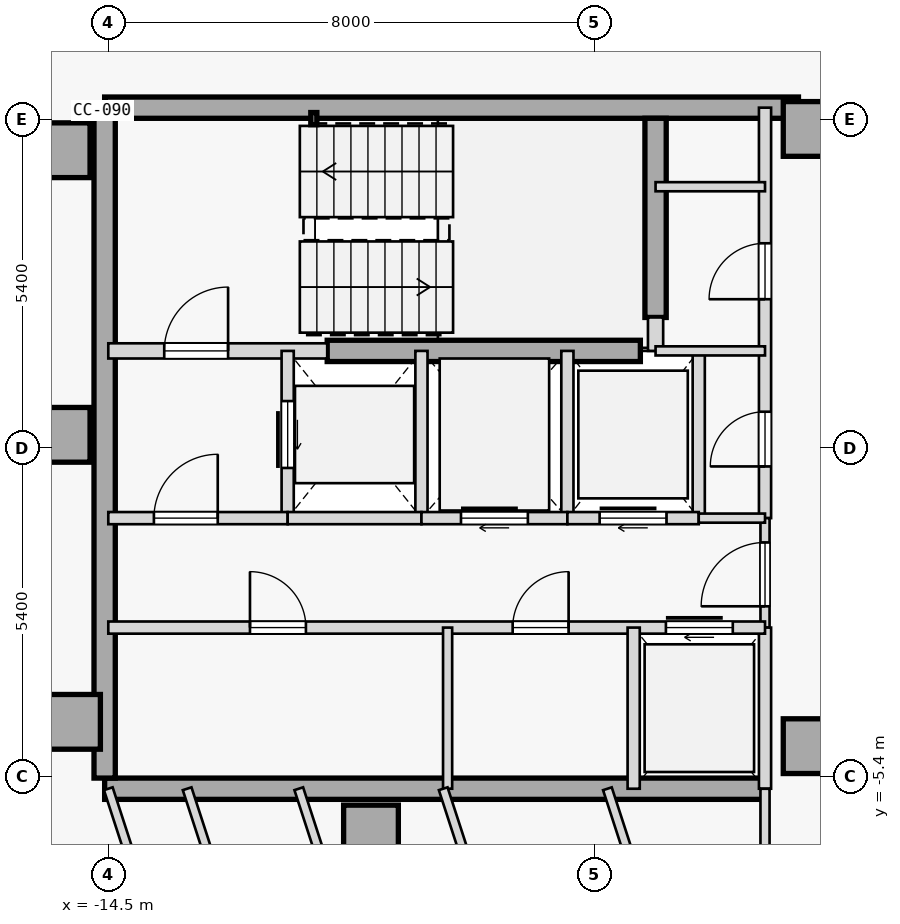
"""IFC4 building model, lengths in metres.
Left out: names, types, materials, properties, quantities, classifications, styles, units other than length and angle.
Written with IfcOpenShell. Run it as: python <this file> out.ifc"""

import sys

from ifc_helpers import new_model, si_unit, direction, frame, frame_2d, origin, origin_2d, place, context, subcontext, project, spatial, rectangle, hollow_rectangle, extrude, element, fill, save


model = new_model("IFC4")
c1 = context("Model", 3, precision=1e-05, world=origin(), true_north=direction((0.0, 1.0)))
c2 = subcontext(c1, "Body", "Model", "MODEL_VIEW")
j1 = project(units=[si_unit("LENGTHUNIT", "METRE"), si_unit("PLANEANGLEUNIT", "RADIAN")], contexts=[c1])
p1 = place(None, origin())
s1 = spatial("IfcSite", under=j1, at=p1, CompositionType="ELEMENT")
p2 = place(p1, origin())
s2 = spatial("IfcBuilding", under=s1, at=p2, CompositionType="ELEMENT")
p3 = place(p2, frame((0.0, 0.0, 244.4)))
s3 = spatial("IfcBuildingStorey", under=s2, at=p3, CompositionType="ELEMENT", Elevation=244.4)
for number, where, z_axis, x_axis in (
    (1, (-15.25, 4.9, 0.0), (0.0, 0.0, 1.0), (1.0, 0.0, 0.0)),
    (2, (-15.25, 0.22, 0.0), (0.0, 0.0, 1.0), (1.0, 0.0, 0.0)),
    (3, (-15.08, -4.5, 0.0), (0.0, 0.0, 1.0), (1.0, 0.0, 0.0)),
    (4, (-10.18, -6.32, 0.0), (0.0, 0.0, 1.0), (1.0, 0.0, 0.0)),
    (5, (-2.95, -4.9, 0.0), (0.0, 0.0, 1.0), (1.0, 0.0, 0.0)),
    (6, (-2.95, 5.25, 0.0), (0.0, 0.0, 1.0), (1.0, 0.0, 0.0)),
):
    element("IfcColumn", number, at=place(p3, frame(where, z_axis=z_axis, x_axis=x_axis)), inside=s3, PredefinedType="COLUMN", context=c2, shape_type="SweptSolid", body=[
        extrude(rectangle(XDim=0.9, YDim=0.9, at=origin_2d()), origin(), (0.0, 0.0, 1.0), 3.35),
    ])
p4 = place(p3, frame((-14.56, 5.6, 0.0), z_axis=(0.0, 0.0, 1.0), x_axis=(1.0, 0.0, 0.0)))
e7 = element("IfcWall", 7, at=p4, inside=s3, PredefinedType="SHEAR", context=c2, shape_type="SweptSolid", body=[
    extrude(rectangle(XDim=11.41, YDim=0.35, at=frame_2d((5.705, 0.0))), origin(), (0.0, 0.0, 1.0), 3.125),
])
p5 = place(p3, frame((-14.56, -5.6, 0.0), z_axis=(0.0, 0.0, 1.0), x_axis=(1.0, 0.0, 0.0)))
e8 = element("IfcWall", 8, at=p5, inside=s3, PredefinedType="SHEAR", context=c2, shape_type="SweptSolid", body=[
    extrude(rectangle(XDim=10.86, YDim=0.35, at=frame_2d((5.43, 0.0))), origin(), (0.0, 0.0, 1.0), 3.125),
])
p6 = place(p3, frame((-14.56, -5.425, 0.0), z_axis=(0.0, 0.0, 1.0), x_axis=(0.0, 1.0, 0.0)))
e9 = element("IfcWall", 9, at=p6, inside=s3, PredefinedType="SHEAR", context=c2, shape_type="SweptSolid", body=[
    extrude(rectangle(XDim=10.85, YDim=0.35, at=frame_2d((5.425, 0.0))), origin(), (0.0, 0.0, 1.0), 3.125),
])
p7 = place(p3, frame((-5.5, 2.15, 0.0), z_axis=(0.0, 0.0, 1.0), x_axis=(0.0, 1.0, 0.0)))
e10 = element("IfcWall", 10, at=p7, inside=s3, PredefinedType="SHEAR", context=c2, shape_type="SweptSolid", body=[
    extrude(rectangle(XDim=3.275, YDim=0.35, at=frame_2d((1.638, 0.0))), origin(), (0.0, 0.0, 1.0), 3.125),
])
p8 = place(p3, frame((-10.9, 1.6, 0.0), z_axis=(0.0, 0.0, 1.0), x_axis=(1.0, 0.0, 0.0)))
e11 = element("IfcWall", 11, at=p8, inside=s3, PredefinedType="SHEAR", context=c2, shape_type="SweptSolid", body=[
    extrude(rectangle(XDim=5.15, YDim=0.35, at=frame_2d((2.575, 0.0))), origin(), (0.0, 0.0, 1.0), 3.125),
])
p9 = place(p3, frame((-11.12, 5.42, 0.0), z_axis=(0.0, 0.0, 1.0), x_axis=(1.0, 0.0, 0.0)))
e12 = element("IfcColumn", 12, at=p9, inside=s3, PredefinedType="COLUMN", context=c2, shape_type="SweptSolid", body=[
    extrude(hollow_rectangle(XDim=0.1, YDim=0.2, WallThickness=0.008, at=origin_2d()), origin(), (0.0, 0.0, 1.0), 3.35),
])
p10 = place(p3, frame((-14.5, 1.6, 0.0), z_axis=(0.0, 0.0, 1.0), x_axis=(1.0, 0.0, 0.0)))
e13 = element("IfcWall", 13, at=p10, inside=s3, PredefinedType="STANDARD", context=c2, shape_type="SweptSolid", body=[
    extrude(rectangle(XDim=3.6, YDim=0.25, at=frame_2d((1.8, 0.0))), origin(), (0.0, 0.0, 1.0), 3.125),
])
p11 = place(p10, frame((0.92, 0.0, 0.0)))
e14 = element("IfcOpeningElement", 14, at=p11, cuts=e13, PredefinedType="OPENING", context=c2, shape_type="SweptSolid", body=[
    extrude(rectangle(XDim=1.05, YDim=2.15, at=frame_2d((0.525, 1.075))), frame((0.0, 0.135, 0.0), z_axis=(0.0, -1.0, 0.0), x_axis=(1.0, 0.0, 0.0)), (0.0, 0.0, 1.0), 0.27),
])
p12 = place(p3, frame((-5.5, 1.6, 0.0), z_axis=(0.0, 0.0, 1.0), x_axis=(0.0, 1.0, 0.0)))
e15 = element("IfcWall", 15, at=p12, inside=s3, PredefinedType="STANDARD", context=c2, shape_type="SweptSolid", body=[
    extrude(rectangle(XDim=0.55, YDim=0.25, at=frame_2d((0.275, 0.0))), origin(), (0.0, 0.0, 1.0), 3.125),
])
p13 = place(p3, frame((-3.7, -1.15, 0.0), z_axis=(0.0, 0.0, 1.0), x_axis=(0.0, 1.0, 0.0)))
e16 = element("IfcWall", 16, at=p13, inside=s3, PredefinedType="STANDARD", context=c2, shape_type="SweptSolid", body=[
    extrude(rectangle(XDim=6.75, YDim=0.2, at=frame_2d((3.375, 0.0))), origin(), (0.0, 0.0, 1.0), 3.125),
])
p14 = place(p13, frame((3.6, 0.0, 0.0)))
e17 = element("IfcOpeningElement", 17, at=p14, cuts=e16, PredefinedType="OPENING", context=c2, shape_type="SweptSolid", body=[
    extrude(rectangle(XDim=0.92, YDim=2.15, at=frame_2d((0.46, 1.075))), frame((0.0, 0.11, 0.0), z_axis=(0.0, -1.0, 0.0), x_axis=(1.0, 0.0, 0.0)), (0.0, 0.0, 1.0), 0.22),
])
p15 = place(p13, frame((0.85, 0.0, 0.0)))
e18 = element("IfcOpeningElement", 18, at=p15, cuts=e16, PredefinedType="OPENING", context=c2, shape_type="SweptSolid", body=[
    extrude(rectangle(XDim=0.9, YDim=2.15, at=frame_2d((0.45, 1.075))), frame((0.0, 0.11, 0.0), z_axis=(0.0, -1.0, 0.0), x_axis=(1.0, 0.0, 0.0)), (0.0, 0.0, 1.0), 0.22),
])
p16 = place(p3, frame((-3.7, -2.95, 0.0), z_axis=(0.0, 0.0, 1.0), x_axis=(0.0, 1.0, 0.0)))
e19 = element("IfcWall", 19, at=p16, inside=s3, PredefinedType="PARTITIONING", context=c2, shape_type="SweptSolid", body=[
    extrude(rectangle(XDim=1.8, YDim=0.15, at=frame_2d((0.9, 0.0))), origin(), (0.0, 0.0, 1.0), 3.125),
])
p17 = place(p16, frame((0.35, 0.0, 0.0)))
e20 = element("IfcOpeningElement", 20, at=p17, cuts=e19, PredefinedType="OPENING", context=c2, shape_type="SweptSolid", body=[
    extrude(rectangle(XDim=1.05, YDim=2.18, at=frame_2d((0.525, 1.09))), frame((0.0, 0.085, 0.0), z_axis=(0.0, -1.0, 0.0), x_axis=(1.0, 0.0, 0.0)), (0.0, 0.0, 1.0), 0.17),
])
p18 = place(p3, frame((-3.7, -5.6, 0.0), z_axis=(0.0, 0.0, 1.0), x_axis=(0.0, 1.0, 0.0)))
e21 = element("IfcWall", 21, at=p18, inside=s3, PredefinedType="STANDARD", context=c2, shape_type="SweptSolid", body=[
    extrude(rectangle(XDim=2.65, YDim=0.2, at=frame_2d((1.325, 0.0))), origin(), (0.0, 0.0, 1.0), 3.125),
])
p19 = place(p3, frame((-11.55, -1.15, 0.0), z_axis=(0.0, 0.0, 1.0), x_axis=(0.0, 1.0, 0.0)))
e22 = element("IfcWall", 22, at=p19, inside=s3, PredefinedType="STANDARD", context=c2, shape_type="SweptSolid", body=[
    extrude(rectangle(XDim=2.75, YDim=0.2, at=frame_2d((1.375, 0.0))), origin(), (0.0, 0.0, 1.0), 3.125),
])
p20 = place(p19, frame((0.825, 0.0, 0.0)))
e23 = element("IfcOpeningElement", 23, at=p20, cuts=e22, PredefinedType="OPENING", context=c2, shape_type="SweptSolid", body=[
    extrude(rectangle(XDim=1.1, YDim=2.15, at=frame_2d((0.55, 1.075))), frame((0.0, 0.11, 0.0), z_axis=(0.0, -1.0, 0.0), x_axis=(1.0, 0.0, 0.0)), (0.0, 0.0, 1.0), 0.22),
])
p21 = place(p3, frame((-9.35, -1.15, 0.0), z_axis=(0.0, 0.0, 1.0), x_axis=(0.0, 1.0, 0.0)))
e24 = element("IfcWall", 24, at=p21, inside=s3, PredefinedType="STANDARD", context=c2, shape_type="SweptSolid", body=[
    extrude(rectangle(XDim=2.75, YDim=0.2, at=frame_2d((1.375, 0.0))), origin(), (0.0, 0.0, 1.0), 3.125),
])
p22 = place(p3, frame((-14.5, -1.15, 0.0), z_axis=(0.0, 0.0, 1.0), x_axis=(1.0, 0.0, 0.0)))
e25 = element("IfcWall", 25, at=p22, inside=s3, PredefinedType="STANDARD", context=c2, shape_type="SweptSolid", body=[
    extrude(rectangle(XDim=2.95, YDim=0.2, at=frame_2d((1.475, 0.0))), origin(), (0.0, 0.0, 1.0), 3.125),
])
p23 = place(p22, frame((0.75, 0.0, 0.0)))
e26 = element("IfcOpeningElement", 26, at=p23, cuts=e25, PredefinedType="OPENING", context=c2, shape_type="SweptSolid", body=[
    extrude(rectangle(XDim=1.05, YDim=2.18, at=frame_2d((0.525, 1.09))), frame((0.0, 0.11, 0.0), z_axis=(0.0, -1.0, 0.0), x_axis=(1.0, 0.0, 0.0)), (0.0, 0.0, 1.0), 0.22),
])
p24 = place(p3, frame((-11.55, -1.15, 0.0), z_axis=(0.0, 0.0, 1.0), x_axis=(1.0, 0.0, 0.0)))
e27 = element("IfcWall", 27, at=p24, inside=s3, PredefinedType="STANDARD", context=c2, shape_type="SweptSolid", body=[
    extrude(rectangle(XDim=2.2, YDim=0.2, at=frame_2d((1.1, 0.0))), origin(), (0.0, 0.0, 1.0), 3.125),
])
p25 = place(p3, frame((-6.95, -1.15, 0.0), z_axis=(0.0, 0.0, 1.0), x_axis=(0.0, 1.0, 0.0)))
e28 = element("IfcWall", 28, at=p25, inside=s3, PredefinedType="STANDARD", context=c2, shape_type="SweptSolid", body=[
    extrude(rectangle(XDim=2.75, YDim=0.2, at=frame_2d((1.375, 0.0))), origin(), (0.0, 0.0, 1.0), 3.125),
])
p26 = place(p3, frame((-9.35, -1.15, 0.0), z_axis=(0.0, 0.0, 1.0), x_axis=(1.0, 0.0, 0.0)))
e29 = element("IfcWall", 29, at=p26, inside=s3, PredefinedType="STANDARD", context=c2, shape_type="SweptSolid", body=[
    extrude(rectangle(XDim=2.4, YDim=0.2, at=frame_2d((1.2, 0.0))), origin(), (0.0, 0.0, 1.0), 3.125),
])
p27 = place(p26, frame((0.65, 0.0, 0.0)))
e30 = element("IfcOpeningElement", 30, at=p27, cuts=e29, PredefinedType="OPENING", context=c2, shape_type="SweptSolid", body=[
    extrude(rectangle(XDim=1.1, YDim=2.15, at=frame_2d((0.55, 1.075))), frame((0.0, 0.11, 0.0), z_axis=(0.0, -1.0, 0.0), x_axis=(1.0, 0.0, 0.0)), (0.0, 0.0, 1.0), 0.22),
])
p28 = place(p3, frame((-4.79, -1.15, 0.0), z_axis=(0.0, 0.0, 1.0), x_axis=(0.0, 1.0, 0.0)))
e31 = element("IfcWall", 31, at=p28, inside=s3, PredefinedType="STANDARD", context=c2, shape_type="SweptSolid", body=[
    extrude(rectangle(XDim=2.75, YDim=0.2, at=frame_2d((1.375, 0.0))), origin(), (0.0, 0.0, 1.0), 3.125),
])
p29 = place(p3, frame((-6.95, -1.15, 0.0), z_axis=(0.0, 0.0, 1.0), x_axis=(1.0, 0.0, 0.0)))
e32 = element("IfcWall", 32, at=p29, inside=s3, PredefinedType="STANDARD", context=c2, shape_type="SweptSolid", body=[
    extrude(rectangle(XDim=2.16, YDim=0.2, at=frame_2d((1.08, 0.0))), origin(), (0.0, 0.0, 1.0), 3.125),
])
p30 = place(p29, frame((0.53, 0.0, 0.0)))
e33 = element("IfcOpeningElement", 33, at=p30, cuts=e32, PredefinedType="OPENING", context=c2, shape_type="SweptSolid", body=[
    extrude(rectangle(XDim=1.1, YDim=2.15, at=frame_2d((0.55, 1.075))), frame((0.0, 0.11, 0.0), z_axis=(0.0, -1.0, 0.0), x_axis=(1.0, 0.0, 0.0)), (0.0, 0.0, 1.0), 0.22),
])
p31 = place(p3, frame((-4.79, -1.15, 0.0), z_axis=(0.0, 0.0, 1.0), x_axis=(1.0, 0.0, 0.0)))
e34 = element("IfcWall", 34, at=p31, inside=s3, PredefinedType="PARTITIONING", context=c2, shape_type="SweptSolid", body=[
    extrude(rectangle(XDim=1.09, YDim=0.15, at=frame_2d((0.545, 0.0))), origin(), (0.0, 0.0, 1.0), 3.125),
])
p32 = place(p3, frame((-14.5, -2.95, 0.0), z_axis=(0.0, 0.0, 1.0), x_axis=(1.0, 0.0, 0.0)))
e35 = element("IfcWall", 35, at=p32, inside=s3, PredefinedType="STANDARD", context=c2, shape_type="SweptSolid", body=[
    extrude(rectangle(XDim=10.8, YDim=0.2, at=frame_2d((5.4, 0.0))), origin(), (0.0, 0.0, 1.0), 3.125),
])
p33 = place(p32, frame((9.17, 0.0, 0.0)))
e36 = element("IfcOpeningElement", 36, at=p33, cuts=e35, PredefinedType="OPENING", context=c2, shape_type="SweptSolid", body=[
    extrude(rectangle(XDim=1.1, YDim=2.15, at=frame_2d((0.55, 1.075))), frame((0.0, 0.11, 0.0), z_axis=(0.0, -1.0, 0.0), x_axis=(1.0, 0.0, 0.0)), (0.0, 0.0, 1.0), 0.22),
])
p34 = place(p32, frame((2.33, 0.0, 0.0)))
e37 = element("IfcOpeningElement", 37, at=p34, cuts=e35, PredefinedType="OPENING", context=c2, shape_type="SweptSolid", body=[
    extrude(rectangle(XDim=0.92, YDim=2.15, at=frame_2d((0.46, 1.075))), frame((0.0, 0.11, 0.0), z_axis=(0.0, -1.0, 0.0), x_axis=(1.0, 0.0, 0.0)), (0.0, 0.0, 1.0), 0.22),
])
p35 = place(p32, frame((6.65, 0.0, 0.0)))
e38 = element("IfcOpeningElement", 38, at=p35, cuts=e35, PredefinedType="OPENING", context=c2, shape_type="SweptSolid", body=[
    extrude(rectangle(XDim=0.92, YDim=2.15, at=frame_2d((0.46, 1.075))), frame((0.0, 0.11, 0.0), z_axis=(0.0, -1.0, 0.0), x_axis=(1.0, 0.0, 0.0)), (0.0, 0.0, 1.0), 0.22),
])
p36 = place(p3, frame((-5.86, -5.6, 0.0), z_axis=(0.0, 0.0, 1.0), x_axis=(0.0, 1.0, 0.0)))
e39 = element("IfcWall", 39, at=p36, inside=s3, PredefinedType="STANDARD", context=c2, shape_type="SweptSolid", body=[
    extrude(rectangle(XDim=2.65, YDim=0.2, at=frame_2d((1.325, 0.0))), origin(), (0.0, 0.0, 1.0), 3.125),
])
p37 = place(p3, frame((-8.92, -5.6, 0.0), z_axis=(0.0, 0.0, 1.0), x_axis=(0.0, 1.0, 0.0)))
e40 = element("IfcWall", 40, at=p37, inside=s3, PredefinedType="PARTITIONING", context=c2, shape_type="SweptSolid", body=[
    extrude(rectangle(XDim=2.65, YDim=0.15, at=frame_2d((1.325, 0.0))), origin(), (0.0, 0.0, 1.0), 3.125),
])
for number, where, z_axis, x_axis in (
    (41, (-5.5, 4.3, 0.0), (0.0, 0.0, 1.0), (1.0, 0.0, 0.0)),
    (42, (-5.5, 1.6, 0.0), (0.0, 0.0, 1.0), (1.0, 0.0, 0.0)),
):
    element("IfcWall", number, at=place(p3, frame(where, z_axis=z_axis, x_axis=x_axis)), inside=s3, PredefinedType="PARTITIONING", context=c2, shape_type="SweptSolid", body=[
        extrude(rectangle(XDim=1.8, YDim=0.15, at=frame_2d((0.9, 0.0))), origin(), (0.0, 0.0, 1.0), 3.125),
    ])
p38 = place(p3, frame((-17.202, 6.426, 0.0), z_axis=(0.0, 0.0, 1.0), x_axis=(0.951035595692, 0.309081373955, 0.0)))
e43 = element("IfcWall", 43, at=p38, inside=s3, PredefinedType="PARTITIONING", context=c2, shape_type="SweptSolid", body=[
    extrude(rectangle(XDim=2.35, YDim=0.15, at=frame_2d((1.175, 0.0))), origin(), (0.0, 0.0, 1.0), 3.125),
])
p39 = place(p3, frame((-3.7, -11.514, 0.0), z_axis=(0.0, 0.0, 1.0), x_axis=(-8.2572974e-05, 0.999999996591, 0.0)))
e44 = element("IfcWall", 44, at=p39, inside=s3, PredefinedType="PARTITIONING", context=c2, shape_type="SweptSolid", body=[
    extrude(rectangle(XDim=5.913, YDim=0.15, at=frame_2d((2.957, 0.0))), origin(), (0.0, 0.0, 1.0), 3.125),
])
p40 = place(p39, frame((2.497, 0.0, 0.0)))
e45 = element("IfcOpeningElement", 45, at=p40, cuts=e44, PredefinedType="OPENING", context=c2, shape_type="SweptSolid", body=[
    extrude(rectangle(XDim=0.92, YDim=2.15, at=frame_2d((0.46, 1.075))), frame((0.0, 0.085, 0.0), z_axis=(0.0, -1.0, 0.0), x_axis=(1.0, 0.0, 0.0)), (0.0, 0.0, 1.0), 0.17),
])
p41 = place(p3, frame((-30.663, -9.757, 0.0), z_axis=(0.0, 0.0, 1.0), x_axis=(0.951058192995, 0.309011833974, 0.0)))
e46 = element("IfcWall", 46, at=p41, inside=s3, PredefinedType="PARTITIONING", context=c2, shape_type="SweptSolid", body=[
    extrude(rectangle(XDim=16.657, YDim=0.15, at=frame_2d((8.329, 0.0))), origin(), (0.0, 0.0, 1.0), 3.125),
])
p42 = place(p3, frame((-13.488, -8.713, 0.0), z_axis=(0.0, 0.0, 1.0), x_axis=(-0.309082700143, 0.951035164687, 0.0)))
e47 = element("IfcWall", 47, at=p42, inside=s3, PredefinedType="PARTITIONING", context=c2, shape_type="SweptSolid", body=[
    extrude(rectangle(XDim=3.274, YDim=0.15, at=frame_2d((1.637, 0.0))), origin(), (0.0, 0.0, 1.0), 3.125),
])
p43 = place(p3, frame((-10.558, -13.742, 0.0), z_axis=(0.0, 0.0, 1.0), x_axis=(-0.309023521796, 0.951054395383, 0.0)))
e48 = element("IfcWall", 48, at=p43, inside=s3, PredefinedType="PARTITIONING", context=c2, shape_type="SweptSolid", body=[
    extrude(rectangle(XDim=8.561, YDim=0.15, at=frame_2d((4.28, 0.0))), origin(), (0.0, 0.0, 1.0), 3.125),
])
p44 = place(p3, frame((-8.897, -13.202, 0.0), z_axis=(0.0, 0.0, 1.0), x_axis=(-0.309008036968, 0.951059426687, 0.0)))
e49 = element("IfcWall", 49, at=p44, inside=s3, PredefinedType="PARTITIONING", context=c2, shape_type="SweptSolid", body=[
    extrude(rectangle(XDim=7.994, YDim=0.15, at=frame_2d((3.997, 0.0))), origin(), (0.0, 0.0, 1.0), 3.125),
])
p45 = place(p3, frame((-6.749, -12.504, 0.0), z_axis=(0.0, 0.0, 1.0), x_axis=(-0.309005471061, 0.95106026037, 0.0)))
e50 = element("IfcWall", 50, at=p45, inside=s3, PredefinedType="PARTITIONING", context=c2, shape_type="SweptSolid", body=[
    extrude(rectangle(XDim=7.26, YDim=0.15, at=frame_2d((3.63, 0.0))), origin(), (0.0, 0.0, 1.0), 3.125),
])
p46 = place(p3, frame((-4.306, -11.711, 0.0), z_axis=(0.0, 0.0, 1.0), x_axis=(-0.309048266124, 0.951046354919, 0.0)))
e51 = element("IfcWall", 51, at=p46, inside=s3, PredefinedType="PARTITIONING", context=c2, shape_type="SweptSolid", body=[
    extrude(rectangle(XDim=6.425, YDim=0.15, at=frame_2d((3.212, 0.0))), origin(), (0.0, 0.0, 1.0), 3.125),
])
p47 = place(p11, origin())
e52 = element("IfcDoor", 52, at=p47, inside=s3, OperationType="SINGLE_SWING_RIGHT", PredefinedType="DOOR", context=c2, shape_type="SweptSolid", body=[
    extrude(rectangle(XDim=1.05, YDim=2.15, at=frame_2d((0.525, 1.075))), frame((0.0, 0.025, 0.0), z_axis=(0.0, -1.0, 0.0), x_axis=(1.0, 0.0, 0.0)), (0.0, 0.0, 1.0), 0.05),
])
fill(e14, e52)
p48 = place(p23, origin())
e53 = element("IfcDoor", 53, at=p48, inside=s3, OperationType="SINGLE_SWING_RIGHT", PredefinedType="DOOR", context=c2, shape_type="SweptSolid", body=[
    extrude(rectangle(XDim=1.05, YDim=2.18, at=frame_2d((0.525, 1.09))), frame((0.0, 0.025, 0.0), z_axis=(0.0, -1.0, 0.0), x_axis=(1.0, 0.0, 0.0)), (0.0, 0.0, 1.0), 0.05),
])
fill(e26, e53)
p49 = place(p17, origin())
e54 = element("IfcDoor", 54, at=p49, inside=s3, OperationType="SINGLE_SWING_LEFT", PredefinedType="DOOR", context=c2, shape_type="SweptSolid", body=[
    extrude(rectangle(XDim=1.05, YDim=2.18, at=frame_2d((0.525, 1.09))), frame((0.0, 0.025, 0.0), z_axis=(0.0, -1.0, 0.0), x_axis=(1.0, 0.0, 0.0)), (0.0, 0.0, 1.0), 0.05),
])
fill(e20, e54)
p50 = place(p20, origin())
e55 = element("IfcDoor", 55, at=p50, inside=s3, OperationType="SLIDING_TO_RIGHT", PredefinedType="DOOR", context=c2, shape_type="SweptSolid", body=[
    extrude(rectangle(XDim=1.1, YDim=2.15, at=frame_2d((0.55, 1.075))), frame((0.0, 0.025, 0.0), z_axis=(0.0, -1.0, 0.0), x_axis=(1.0, 0.0, 0.0)), (0.0, 0.0, 1.0), 0.05),
])
fill(e23, e55)
p51 = place(p27, origin())
e56 = element("IfcDoor", 56, at=p51, inside=s3, OperationType="SLIDING_TO_RIGHT", PredefinedType="DOOR", context=c2, shape_type="SweptSolid", body=[
    extrude(rectangle(XDim=1.1, YDim=2.15, at=frame_2d((0.55, 1.075))), frame((0.0, 0.025, 0.0), z_axis=(0.0, -1.0, 0.0), x_axis=(1.0, 0.0, 0.0)), (0.0, 0.0, 1.0), 0.05),
])
fill(e30, e56)
p52 = place(p30, origin())
e57 = element("IfcDoor", 57, at=p52, inside=s3, OperationType="SLIDING_TO_RIGHT", PredefinedType="DOOR", context=c2, shape_type="SweptSolid", body=[
    extrude(rectangle(XDim=1.1, YDim=2.15, at=frame_2d((0.55, 1.075))), frame((0.0, 0.025, 0.0), z_axis=(0.0, -1.0, 0.0), x_axis=(1.0, 0.0, 0.0)), (0.0, 0.0, 1.0), 0.05),
])
fill(e33, e57)
p53 = place(p33, origin())
e58 = element("IfcDoor", 58, at=p53, inside=s3, OperationType="SLIDING_TO_RIGHT", PredefinedType="DOOR", context=c2, shape_type="SweptSolid", body=[
    extrude(rectangle(XDim=1.1, YDim=2.15, at=frame_2d((0.55, 1.075))), frame((0.0, 0.025, 0.0), z_axis=(0.0, -1.0, 0.0), x_axis=(1.0, 0.0, 0.0)), (0.0, 0.0, 1.0), 0.05),
])
fill(e36, e58)
p54 = place(p34, origin())
e59 = element("IfcDoor", 59, at=p54, inside=s3, OperationType="SINGLE_SWING_LEFT", PredefinedType="DOOR", context=c2, shape_type="SweptSolid", body=[
    extrude(rectangle(XDim=0.92, YDim=2.15, at=frame_2d((0.46, 1.075))), frame((0.0, 0.025, 0.0), z_axis=(0.0, -1.0, 0.0), x_axis=(1.0, 0.0, 0.0)), (0.0, 0.0, 1.0), 0.05),
])
fill(e37, e59)
p55 = place(p35, origin())
e60 = element("IfcDoor", 60, at=p55, inside=s3, OperationType="SINGLE_SWING_RIGHT", PredefinedType="DOOR", context=c2, shape_type="SweptSolid", body=[
    extrude(rectangle(XDim=0.92, YDim=2.15, at=frame_2d((0.46, 1.075))), frame((0.0, 0.025, 0.0), z_axis=(0.0, -1.0, 0.0), x_axis=(1.0, 0.0, 0.0)), (0.0, 0.0, 1.0), 0.05),
])
fill(e38, e60)
p56 = place(p14, origin())
e61 = element("IfcDoor", 61, at=p56, inside=s3, OperationType="SINGLE_SWING_LEFT", PredefinedType="DOOR", context=c2, shape_type="SweptSolid", body=[
    extrude(rectangle(XDim=0.92, YDim=2.15, at=frame_2d((0.46, 1.075))), frame((0.0, 0.025, 0.0), z_axis=(0.0, -1.0, 0.0), x_axis=(1.0, 0.0, 0.0)), (0.0, 0.0, 1.0), 0.05),
])
fill(e17, e61)
p57 = place(p15, origin())
e62 = element("IfcDoor", 62, at=p57, inside=s3, OperationType="SINGLE_SWING_LEFT", PredefinedType="DOOR", context=c2, shape_type="SweptSolid", body=[
    extrude(rectangle(XDim=0.9, YDim=2.15, at=frame_2d((0.45, 1.075))), frame((0.0, 0.025, 0.0), z_axis=(0.0, -1.0, 0.0), x_axis=(1.0, 0.0, 0.0)), (0.0, 0.0, 1.0), 0.05),
])
fill(e18, e62)
save(model, sys.argv[1])
